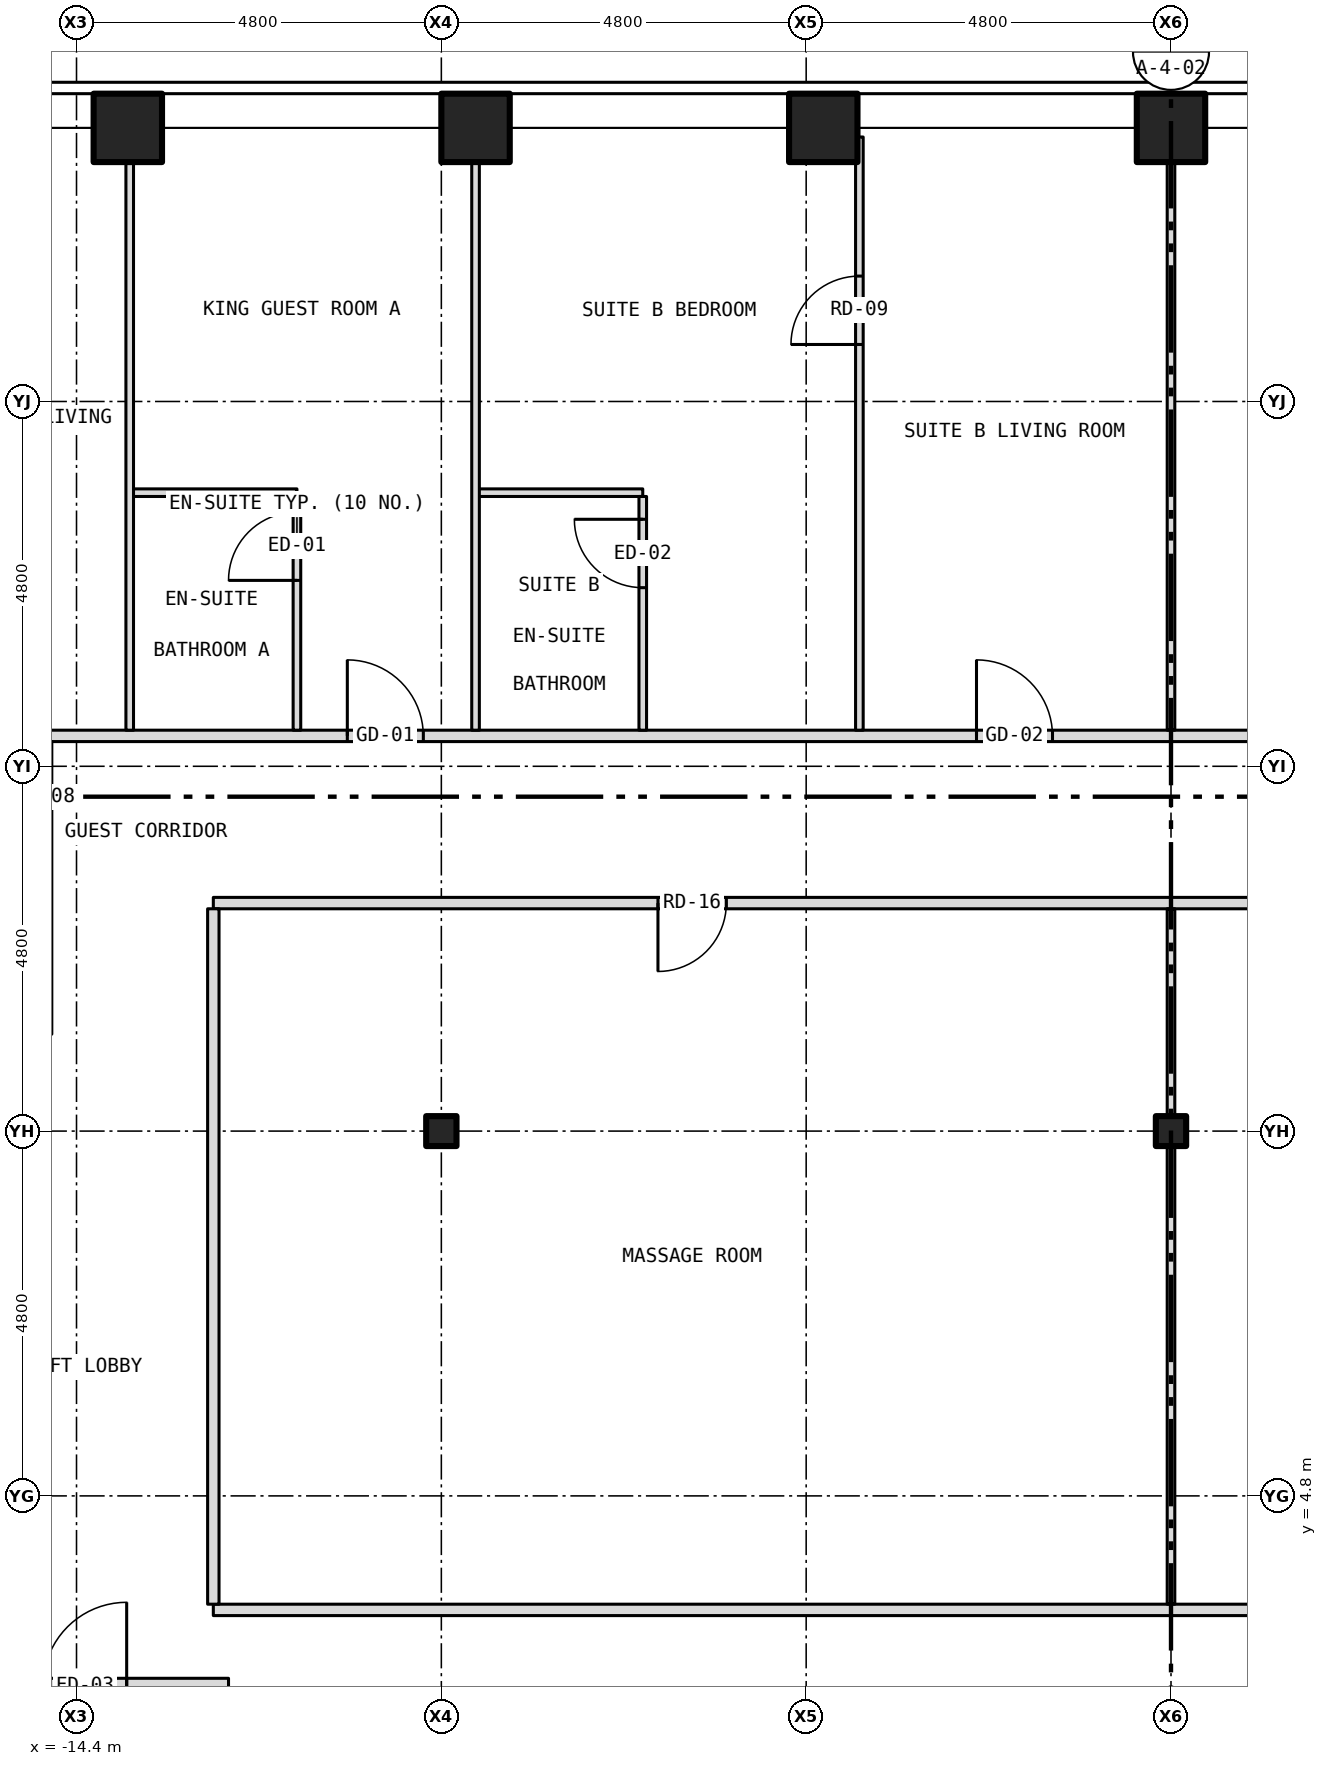
"""IFC4 building model, lengths in metres.
Left out: names, types, materials, properties, quantities, classifications, styles, units other than length and angle.
Written with IfcOpenShell. Run it as: python <this file> out.ifc"""

import sys

from ifc_helpers import new_model, si_unit, direction, frame, frame_2d, origin, origin_2d, place, context, subcontext, project, spatial, rectangle, hollow_rectangle, i_section, extrude, element, fill, save


model = new_model("IFC4")
c1 = context("Model", 3, precision=1e-05, world=origin(), true_north=direction((0.0, 1.0)))
c2 = subcontext(c1, "Body", "Model", "MODEL_VIEW")
j1 = project(units=[si_unit("LENGTHUNIT", "METRE"), si_unit("PLANEANGLEUNIT", "RADIAN")], contexts=[c1])
p1 = place(None, origin())
s1 = spatial("IfcSite", under=j1, at=p1, CompositionType="ELEMENT")
p2 = place(p1, origin())
s2 = spatial("IfcBuilding", under=s1, at=p2, CompositionType="ELEMENT")
p3 = place(p2, frame((0.0, 0.0, 99.5)))
s3 = spatial("IfcBuildingStorey", under=s2, at=p3, CompositionType="ELEMENT", Elevation=99.5)
for number, where, z_axis, x_axis in (
    (1, (-13.725, 22.8, -0.15), (0.0, 0.0, 1.0), (1.0, 0.0, 0.0)),
    (2, (-9.15, 22.8, -0.15), (0.0, 0.0, 1.0), (1.0, 0.0, 0.0)),
    (3, (-4.575, 22.8, -0.15), (0.0, 0.0, 1.0), (1.0, 0.0, 0.0)),
    (4, (0.0, 22.8, -0.15), (0.0, 0.0, 1.0), (1.0, 0.0, 0.0)),
):
    element("IfcColumn", number, at=place(p3, frame(where, z_axis=z_axis, x_axis=x_axis)), inside=s3, PredefinedType="COLUMN", context=c2, shape_type="SweptSolid", body=[
        extrude(hollow_rectangle(XDim=0.9, YDim=0.9, WallThickness=0.05, at=origin_2d()), origin(), (0.0, 0.0, 1.0), 3.5),
    ])
for number, where, z_axis, x_axis in (
    (5, (-9.6, 9.6, -0.15), (0.0, 0.0, 1.0), (1.0, 0.0, 0.0)),
    (6, (0.0, 9.6, -0.15), (0.0, 0.0, 1.0), (1.0, 0.0, 0.0)),
):
    element("IfcColumn", number, at=place(p3, frame(where, z_axis=z_axis, x_axis=x_axis)), inside=s3, PredefinedType="COLUMN", context=c2, shape_type="SweptSolid", body=[
        extrude(i_section(OverallWidth=0.399, OverallDepth=0.394, WebThickness=0.023, FlangeThickness=0.037, at=origin_2d()), origin(), (0.0, 0.0, 1.0), 3.5),
    ])
p4 = place(p3, frame((-15.68, 2.3, 0.0), z_axis=(0.0, 0.0, 1.0), x_axis=(1.0, 0.0, 0.0)))
e7 = element("IfcWall", 7, at=p4, inside=s3, PredefinedType="PARTITIONING", context=c2, shape_type="SweptSolid", body=[
    extrude(rectangle(XDim=3.28, YDim=0.2, at=frame_2d((1.64, 0.0))), origin(), (0.0, 0.0, 1.0), 3.35),
])
p5 = place(p4, frame((0.84, 0.0, 0.0)))
e8 = element("IfcOpeningElement", 8, at=p5, cuts=e7, PredefinedType="OPENING", context=c2, shape_type="SweptSolid", body=[
    extrude(rectangle(XDim=1.1, YDim=2.1, at=frame_2d((0.55, 1.05))), frame((0.0, 0.112, 0.0), z_axis=(0.0, -1.0, 0.0), x_axis=(1.0, 0.0, 0.0)), (0.0, 0.0, 1.0), 0.224),
])
p6 = place(p3, frame((-12.6, 3.3, 0.0), z_axis=(0.0, 0.0, 1.0), x_axis=(1.0, 0.0, 0.0)))
e9 = element("IfcWall", 9, at=p6, inside=s3, PredefinedType="PARTITIONING", context=c2, shape_type="SweptSolid", body=[
    extrude(rectangle(XDim=25.2, YDim=0.15, at=frame_2d((12.6, 0.0))), origin(), (0.0, 0.0, 1.0), 3.35),
])
p7 = place(p3, frame((-12.6, 12.6, 0.0), z_axis=(0.0, 0.0, 1.0), x_axis=(1.0, 0.0, 0.0)))
e10 = element("IfcWall", 10, at=p7, inside=s3, PredefinedType="PARTITIONING", context=c2, shape_type="SweptSolid", body=[
    extrude(rectangle(XDim=25.2, YDim=0.15, at=frame_2d((12.6, 0.0))), origin(), (0.0, 0.0, 1.0), 3.35),
])
p8 = place(p7, frame((5.85, 0.0, 0.0)))
e11 = element("IfcOpeningElement", 11, at=p8, cuts=e10, PredefinedType="OPENING", context=c2, shape_type="SweptSolid", body=[
    extrude(rectangle(XDim=0.9, YDim=2.1, at=frame_2d((0.45, 1.05))), frame((0.0, 0.087, 0.0), z_axis=(0.0, -1.0, 0.0), x_axis=(1.0, 0.0, 0.0)), (0.0, 0.0, 1.0), 0.174),
])
p9 = place(p7, frame((18.45, 0.0, 0.0)))
e12 = element("IfcOpeningElement", 12, at=p9, cuts=e10, PredefinedType="OPENING", context=c2, shape_type="SweptSolid", body=[
    extrude(rectangle(XDim=0.9, YDim=2.1, at=frame_2d((0.45, 1.05))), frame((0.0, 0.087, 0.0), z_axis=(0.0, -1.0, 0.0), x_axis=(1.0, 0.0, 0.0)), (0.0, 0.0, 1.0), 0.174),
])
p10 = place(p3, frame((-14.8, 14.8, 0.0), z_axis=(0.0, 0.0, 1.0), x_axis=(1.0, 0.0, 0.0)))
e13 = element("IfcWall", 13, at=p10, inside=s3, PredefinedType="PARTITIONING", context=c2, shape_type="SweptSolid", body=[
    extrude(rectangle(XDim=29.6, YDim=0.15, at=frame_2d((14.8, 0.0))), origin(), (0.0, 0.0, 1.0), 3.35),
])
p11 = place(p10, frame((3.963, 0.0, 0.0)))
e14 = element("IfcOpeningElement", 14, at=p11, cuts=e13, PredefinedType="OPENING", context=c2, shape_type="SweptSolid", body=[
    extrude(rectangle(XDim=1.0, YDim=2.1, at=frame_2d((0.5, 1.05))), frame((0.0, 0.087, 0.0), z_axis=(0.0, -1.0, 0.0), x_axis=(1.0, 0.0, 0.0)), (0.0, 0.0, 1.0), 0.174),
])
p12 = place(p10, frame((12.241, 0.0, 0.0)))
e15 = element("IfcOpeningElement", 15, at=p12, cuts=e13, PredefinedType="OPENING", context=c2, shape_type="SweptSolid", body=[
    extrude(rectangle(XDim=1.0, YDim=2.1, at=frame_2d((0.5, 1.05))), frame((0.0, 0.087, 0.0), z_axis=(0.0, -1.0, 0.0), x_axis=(1.0, 0.0, 0.0)), (0.0, 0.0, 1.0), 0.174),
])
p13 = place(p10, frame((21.213, 0.0, 0.0)))
e16 = element("IfcOpeningElement", 16, at=p13, cuts=e13, PredefinedType="OPENING", context=c2, shape_type="SweptSolid", body=[
    extrude(rectangle(XDim=0.9, YDim=2.1, at=frame_2d((0.45, 1.05))), frame((0.0, 0.087, 0.0), z_axis=(0.0, -1.0, 0.0), x_axis=(1.0, 0.0, 0.0)), (0.0, 0.0, 1.0), 0.174),
])
for number, where, z_axis, x_axis in (
    (17, (-13.7, 18.0, 0.0), (0.0, 0.0, 1.0), (1.0, 0.0, 0.0)),
    (18, (-9.15, 18.0, 0.0), (0.0, 0.0, 1.0), (1.0, 0.0, 0.0)),
):
    element("IfcWall", number, at=place(p3, frame(where, z_axis=z_axis, x_axis=x_axis)), inside=s3, PredefinedType="PARTITIONING", context=c2, shape_type="SweptSolid", body=[
        extrude(rectangle(XDim=2.2, YDim=0.1, at=frame_2d((1.1, 0.0))), origin(), (0.0, 0.0, 1.0), 3.35),
    ])
p14 = place(p3, frame((-13.7, 14.875, 0.0), z_axis=(0.0, 0.0, 1.0), x_axis=(0.0, 1.0, 0.0)))
e19 = element("IfcWall", 19, at=p14, inside=s3, PredefinedType="PARTITIONING", context=c2, shape_type="SweptSolid", body=[
    extrude(rectangle(XDim=7.805, YDim=0.1, at=frame_2d((3.902, 0.0))), origin(), (0.0, 0.0, 1.0), 3.35),
])
p15 = place(p3, frame((-12.6, 3.375, 0.0), z_axis=(0.0, 0.0, 1.0), x_axis=(0.0, 1.0, 0.0)))
e20 = element("IfcWall", 20, at=p15, inside=s3, PredefinedType="PARTITIONING", context=c2, shape_type="SweptSolid", body=[
    extrude(rectangle(XDim=9.15, YDim=0.15, at=frame_2d((4.575, 0.0))), origin(), (0.0, 0.0, 1.0), 3.35),
])
p16 = place(p3, frame((-11.5, 14.875, 0.0), z_axis=(0.0, 0.0, 1.0), x_axis=(0.0, 1.0, 0.0)))
e21 = element("IfcWall", 21, at=p16, inside=s3, PredefinedType="PARTITIONING", context=c2, shape_type="SweptSolid", body=[
    extrude(rectangle(XDim=3.075, YDim=0.1, at=frame_2d((1.538, 0.0))), origin(), (0.0, 0.0, 1.0), 3.35),
])
p17 = place(p16, frame((1.971, 0.0, 0.0)))
e22 = element("IfcOpeningElement", 22, at=p17, cuts=e21, PredefinedType="OPENING", context=c2, shape_type="SweptSolid", body=[
    extrude(rectangle(XDim=0.9, YDim=2.1, at=frame_2d((0.45, 1.05))), frame((0.0, 0.062, 0.0), z_axis=(0.0, -1.0, 0.0), x_axis=(1.0, 0.0, 0.0)), (0.0, 0.0, 1.0), 0.124),
])
p18 = place(p3, frame((-9.15, 14.875, 0.0), z_axis=(0.0, 0.0, 1.0), x_axis=(0.0, 1.0, 0.0)))
e23 = element("IfcWall", 23, at=p18, inside=s3, PredefinedType="PARTITIONING", context=c2, shape_type="SweptSolid", body=[
    extrude(rectangle(XDim=7.805, YDim=0.1, at=frame_2d((3.902, 0.0))), origin(), (0.0, 0.0, 1.0), 3.35),
])
p19 = place(p3, frame((-6.95, 14.875, 0.0), z_axis=(0.0, 0.0, 1.0), x_axis=(0.0, 1.0, 0.0)))
e24 = element("IfcWall", 24, at=p19, inside=s3, PredefinedType="PARTITIONING", context=c2, shape_type="SweptSolid", body=[
    extrude(rectangle(XDim=3.075, YDim=0.1, at=frame_2d((1.538, 0.0))), origin(), (0.0, 0.0, 1.0), 3.35),
])
p20 = place(p19, frame((1.875, 0.0, 0.0)))
e25 = element("IfcOpeningElement", 25, at=p20, cuts=e24, PredefinedType="OPENING", context=c2, shape_type="SweptSolid", body=[
    extrude(rectangle(XDim=0.9, YDim=2.1, at=frame_2d((0.45, 1.05))), frame((0.0, 0.062, 0.0), z_axis=(0.0, -1.0, 0.0), x_axis=(1.0, 0.0, 0.0)), (0.0, 0.0, 1.0), 0.124),
])
p21 = place(p3, frame((-4.1, 14.875, 0.0), z_axis=(0.0, 0.0, 1.0), x_axis=(0.0, 1.0, 0.0)))
e26 = element("IfcWall", 26, at=p21, inside=s3, PredefinedType="PARTITIONING", context=c2, shape_type="SweptSolid", body=[
    extrude(rectangle(XDim=7.805, YDim=0.1, at=frame_2d((3.902, 0.0))), origin(), (0.0, 0.0, 1.0), 3.35),
])
p22 = place(p21, frame((5.075, 0.0, 0.0)))
e27 = element("IfcOpeningElement", 27, at=p22, cuts=e26, PredefinedType="OPENING", context=c2, shape_type="SweptSolid", body=[
    extrude(rectangle(XDim=0.9, YDim=2.1, at=frame_2d((0.45, 1.05))), frame((0.0, 0.062, 0.0), z_axis=(0.0, -1.0, 0.0), x_axis=(1.0, 0.0, 0.0)), (0.0, 0.0, 1.0), 0.124),
])
p23 = place(p3, frame((0.0, 3.375, 0.0), z_axis=(0.0, 0.0, 1.0), x_axis=(0.0, 1.0, 0.0)))
e28 = element("IfcWall", 28, at=p23, inside=s3, PredefinedType="PARTITIONING", context=c2, shape_type="SweptSolid", body=[
    extrude(rectangle(XDim=6.026, YDim=0.1, at=frame_2d((3.013, 0.0))), origin(), (0.0, 0.0, 1.0), 2.728),
])
p24 = place(p3, frame((0.0, 9.401, 0.0), z_axis=(0.0, 0.0, 1.0), x_axis=(0.0, 1.0, 0.0)))
e29 = element("IfcWall", 29, at=p24, inside=s3, PredefinedType="PARTITIONING", context=c2, shape_type="SweptSolid", body=[
    extrude(rectangle(XDim=0.398, YDim=0.1, at=frame_2d((0.199, 0.0))), origin(), (0.0, 0.0, 1.0), 3.35),
])
p25 = place(p3, frame((0.0, 9.799, 0.0), z_axis=(0.0, 0.0, 1.0), x_axis=(0.0, 1.0, 0.0)))
e30 = element("IfcWall", 30, at=p25, inside=s3, PredefinedType="PARTITIONING", context=c2, shape_type="SweptSolid", body=[
    extrude(rectangle(XDim=2.726, YDim=0.1, at=frame_2d((1.363, 0.0))), origin(), (0.0, 0.0, 1.0), 2.728),
])
p26 = place(p3, frame((0.0, 14.875, 0.0), z_axis=(0.0, 0.0, 1.0), x_axis=(0.0, 1.0, 0.0)))
e31 = element("IfcWall", 31, at=p26, inside=s3, PredefinedType="PARTITIONING", context=c2, shape_type="SweptSolid", body=[
    extrude(rectangle(XDim=7.475, YDim=0.1, at=frame_2d((3.738, 0.0))), origin(), (0.0, 0.0, 1.0), 2.728),
])
p27 = place(p3, frame((0.0, 22.35, 0.0), z_axis=(0.0, 0.0, 1.0), x_axis=(0.0, 1.0, 0.0)))
e32 = element("IfcWall", 32, at=p27, inside=s3, PredefinedType="PARTITIONING", context=c2, shape_type="SweptSolid", body=[
    extrude(rectangle(XDim=0.33, YDim=0.1, at=frame_2d((0.165, 0.0))), origin(), (0.0, 0.0, 1.0), 3.35),
])
p28 = place(p5, origin())
e33 = element("IfcDoor", 33, at=p28, inside=s3, OperationType="SINGLE_SWING_RIGHT", PredefinedType="DOOR", context=c2, shape_type="SweptSolid", body=[
    extrude(rectangle(XDim=1.1, YDim=2.1, at=frame_2d((0.55, 1.05))), frame((0.0, 0.025, 0.0), z_axis=(0.0, -1.0, 0.0), x_axis=(1.0, 0.0, 0.0)), (0.0, 0.0, 1.0), 0.05),
])
fill(e8, e33)
p29 = place(p11, origin())
e34 = element("IfcDoor", 34, at=p29, inside=s3, OperationType="SINGLE_SWING_LEFT", PredefinedType="DOOR", context=c2, shape_type="SweptSolid", body=[
    extrude(rectangle(XDim=1.0, YDim=2.1, at=frame_2d((0.5, 1.05))), frame((0.0, 0.025, 0.0), z_axis=(0.0, -1.0, 0.0), x_axis=(1.0, 0.0, 0.0)), (0.0, 0.0, 1.0), 0.05),
])
fill(e14, e34)
p30 = place(p17, origin())
e35 = element("IfcDoor", 35, at=p30, inside=s3, OperationType="SINGLE_SWING_LEFT", PredefinedType="DOOR", context=c2, shape_type="SweptSolid", body=[
    extrude(rectangle(XDim=0.9, YDim=2.1, at=frame_2d((0.45, 1.05))), frame((0.0, 0.025, 0.0), z_axis=(0.0, -1.0, 0.0), x_axis=(1.0, 0.0, 0.0)), (0.0, 0.0, 1.0), 0.05),
])
fill(e22, e35)
p31 = place(p12, origin())
e36 = element("IfcDoor", 36, at=p31, inside=s3, OperationType="SINGLE_SWING_LEFT", PredefinedType="DOOR", context=c2, shape_type="SweptSolid", body=[
    extrude(rectangle(XDim=1.0, YDim=2.1, at=frame_2d((0.5, 1.05))), frame((0.0, 0.025, 0.0), z_axis=(0.0, -1.0, 0.0), x_axis=(1.0, 0.0, 0.0)), (0.0, 0.0, 1.0), 0.05),
])
fill(e15, e36)
p32 = place(p22, origin())
e37 = element("IfcDoor", 37, at=p32, inside=s3, OperationType="SINGLE_SWING_LEFT", PredefinedType="DOOR", context=c2, shape_type="SweptSolid", body=[
    extrude(rectangle(XDim=0.9, YDim=2.1, at=frame_2d((0.45, 1.05))), frame((0.0, 0.025, 0.0), z_axis=(0.0, -1.0, 0.0), x_axis=(1.0, 0.0, 0.0)), (0.0, 0.0, 1.0), 0.05),
])
fill(e27, e37)
p33 = place(p20, origin())
e38 = element("IfcDoor", 38, at=p33, inside=s3, OperationType="SINGLE_SWING_RIGHT", PredefinedType="DOOR", context=c2, shape_type="SweptSolid", body=[
    extrude(rectangle(XDim=0.9, YDim=2.1, at=frame_2d((0.45, 1.05))), frame((0.0, 0.025, 0.0), z_axis=(0.0, -1.0, 0.0), x_axis=(1.0, 0.0, 0.0)), (0.0, 0.0, 1.0), 0.05),
])
fill(e25, e38)
p34 = place(p8, origin())
e39 = element("IfcDoor", 39, at=p34, inside=s3, OperationType="SINGLE_SWING_LEFT", PredefinedType="DOOR", context=c2, shape_type="SweptSolid", body=[
    extrude(rectangle(XDim=0.9, YDim=2.1, at=frame_2d((0.45, 1.05))), frame((0.0, 0.025, 0.0), z_axis=(0.0, -1.0, 0.0), x_axis=(1.0, 0.0, 0.0)), (0.0, 0.0, 1.0), 0.05),
])
fill(e11, e39)
save(model, sys.argv[1])
